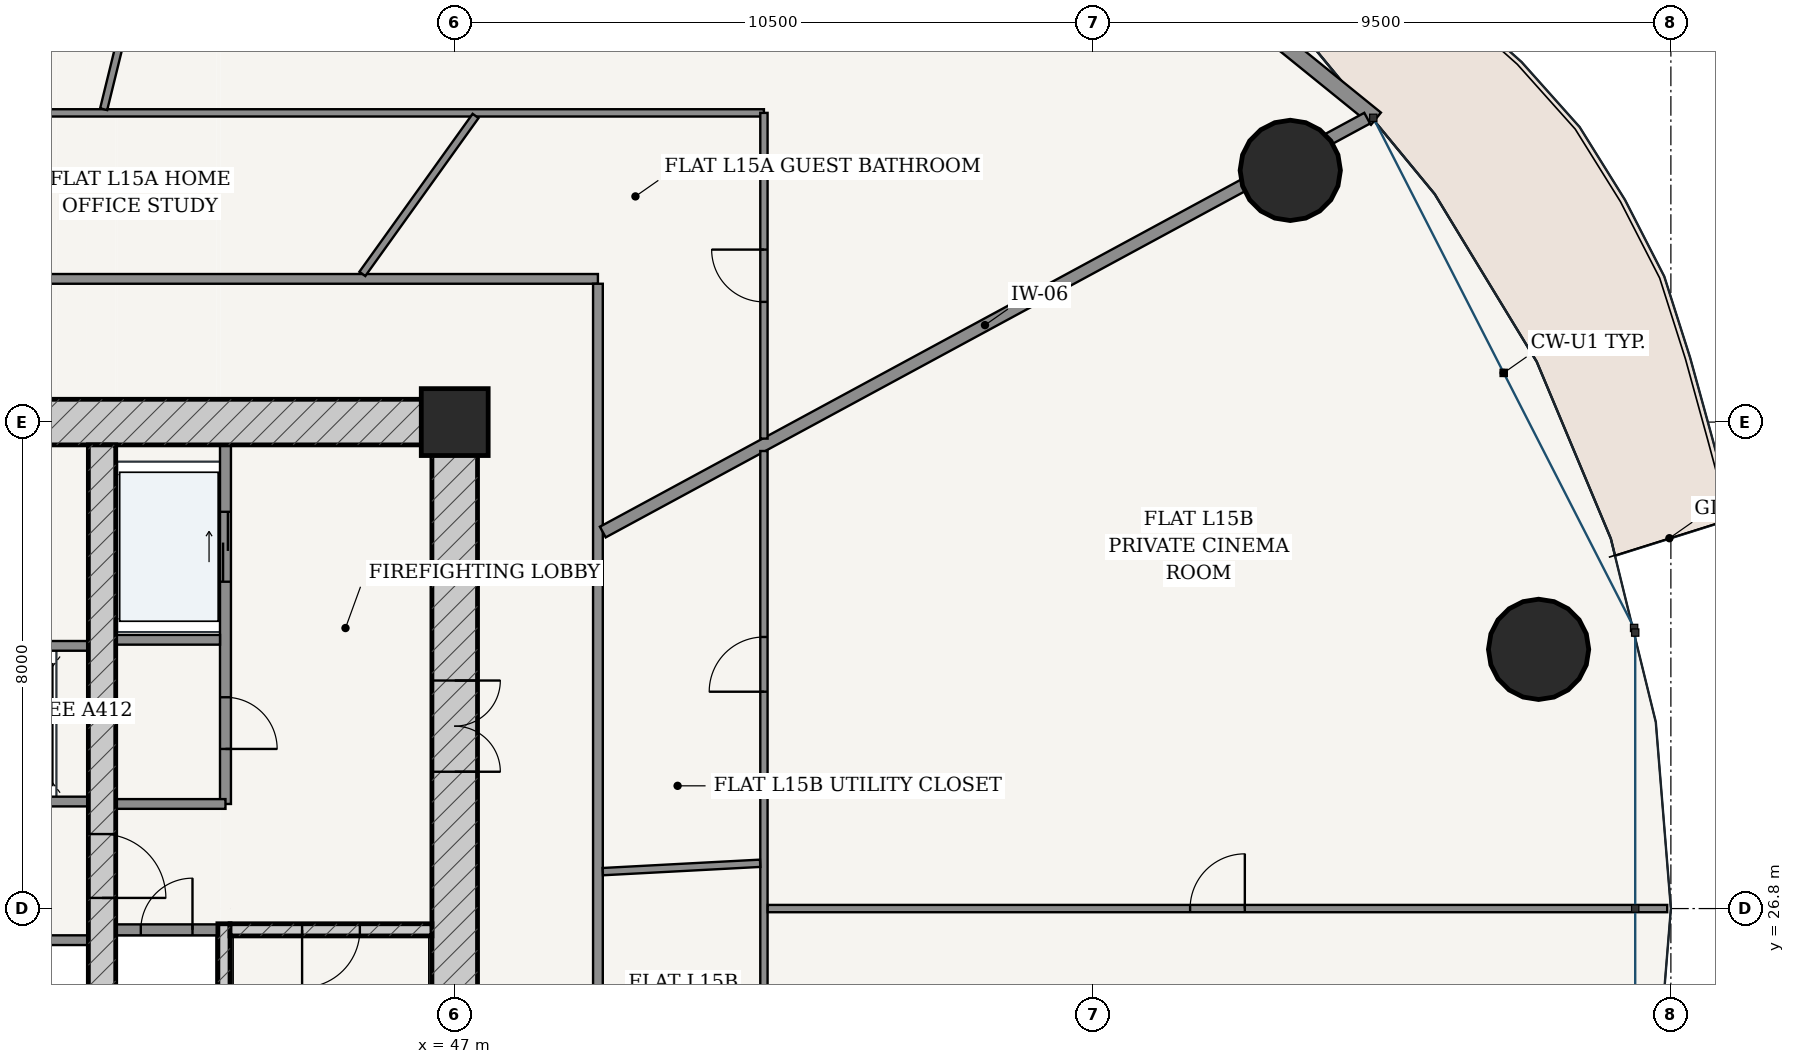
"""IFC4 building model, lengths in metres.
Left out: names, types, materials, properties, quantities, classifications, styles, units other than length and angle.
Written with IfcOpenShell. Run it as: python <this file> out.ifc"""

import sys

from ifc_helpers import new_model, si_unit, direction, frame, frame_2d, origin, origin_2d, place, context, subcontext, project, spatial, rectangle, hollow_circle, extrude, source, transform, mapped, element, fill, save


model = new_model("IFC4")
c1 = context("Model", 3, precision=1e-05, world=origin(), true_north=direction((-0.2419218956, 0.970295726276)))
c2 = subcontext(c1, "Body", "Model", "MODEL_VIEW")
j1 = project(units=[si_unit("LENGTHUNIT", "METRE"), si_unit("PLANEANGLEUNIT", "RADIAN")], contexts=[c1])
p1 = place(None, origin())
s1 = spatial("IfcSite", under=j1, at=p1, CompositionType="ELEMENT")
p2 = place(p1, origin())
s2 = spatial("IfcBuilding", under=s1, at=p2, CompositionType="ELEMENT")
p3 = place(p2, frame((0.0, 0.0, 60.0)))
s3 = spatial("IfcBuildingStorey", under=s2, at=p3, CompositionType="ELEMENT", Elevation=60.0)
p4 = place(p3, frame((47.0, 34.8, 0.0), z_axis=(0.0, 0.0, 1.0), x_axis=(1.0, 0.0, 0.0)))
e1 = element("IfcColumn", 1, at=p4, inside=s3, PredefinedType="COLUMN", context=c2, shape_type="SweptSolid", body=[
    extrude(rectangle(XDim=1.1, YDim=1.1, at=origin_2d()), origin(), (0.0, 0.0, 1.0), 3.6),
])
p5 = place(p3, frame((28.625, 34.8, 0.0), z_axis=(0.0, 0.0, 1.0), x_axis=(1.0, 0.0, 0.0)))
e2 = element("IfcWall", 2, at=p5, inside=s3, PredefinedType="SHEAR", context=c2, shape_type="SweptSolid", body=[
    extrude(rectangle(XDim=18.75, YDim=0.75, at=frame_2d((9.375, 0.0))), origin(), (0.0, 0.0, 1.0), 3.32),
])
p6 = place(p5, frame((8.95, 0.0, 0.0)))
e3 = element("IfcOpeningElement", 3, at=p6, cuts=e2, PredefinedType="OPENING", context=c2, shape_type="SweptSolid", body=[
    extrude(rectangle(XDim=0.85, YDim=2.1, at=frame_2d((0.425, 1.05))), frame((0.0, 0.385, 0.0), z_axis=(0.0, -1.0, 0.0), x_axis=(1.0, 0.0, 0.0)), (0.0, 0.0, 1.0), 0.77),
])
p7 = place(p3, frame((47.0, 19.175, 0.0), z_axis=(0.0, 0.0, 1.0), x_axis=(0.0, 1.0, 0.0)))
e4 = element("IfcWall", 4, at=p7, inside=s3, PredefinedType="SHEAR", context=c2, shape_type="SweptSolid", body=[
    extrude(rectangle(XDim=15.25, YDim=0.75, at=frame_2d((7.625, 0.0))), origin(), (0.0, 0.0, 1.0), 3.32),
])
p8 = place(p7, frame((9.875, 0.0, 0.0)))
e5 = element("IfcOpeningElement", 5, at=p8, cuts=e4, PredefinedType="OPENING", context=c2, shape_type="SweptSolid", body=[
    extrude(rectangle(XDim=1.5, YDim=2.2, at=frame_2d((0.75, 1.1))), frame((0.0, 0.385, 0.0), z_axis=(0.0, -1.0, 0.0), x_axis=(1.0, 0.0, 0.0)), (0.0, 0.0, 1.0), 0.77),
])
p9 = place(p3, frame((43.205, 19.175, 0.0), z_axis=(0.0, 0.0, 1.0), x_axis=(0.0, 1.0, 0.0)))
e6 = element("IfcWall", 6, at=p9, inside=s3, PredefinedType="SOLIDWALL", context=c2, shape_type="SweptSolid", body=[
    extrude(rectangle(XDim=7.375, YDim=0.2, at=frame_2d((3.688, 0.0))), origin(), (0.0, 0.0, 1.0), 3.32),
])
p10 = place(p3, frame((43.305, 26.45, 0.0), z_axis=(0.0, 0.0, 1.0), x_axis=(1.0, 0.0, 0.0)))
e7 = element("IfcWall", 7, at=p10, inside=s3, PredefinedType="SOLIDWALL", context=c2, shape_type="SweptSolid", body=[
    extrude(rectangle(XDim=3.32, YDim=0.2, at=frame_2d((1.66, 0.0))), origin(), (0.0, 0.0, 1.0), 3.32),
])
p11 = place(p10, frame((1.185, 0.0, 0.0)))
e8 = element("IfcOpeningElement", 8, at=p11, cuts=e7, PredefinedType="OPENING", context=c2, shape_type="SweptSolid", body=[
    extrude(rectangle(XDim=0.95, YDim=2.15, at=frame_2d((0.475, 1.075))), frame((0.0, 0.11, 0.0), z_axis=(0.0, -1.0, 0.0), x_axis=(1.0, 0.0, 0.0)), (0.0, 0.0, 1.0), 0.22),
])
p12 = place(p3, frame((41.2, 19.175, 0.0), z_axis=(0.0, 0.0, 1.0), x_axis=(0.0, 1.0, 0.0)))
e9 = element("IfcWall", 9, at=p12, inside=s3, PredefinedType="SHEAR", context=c2, shape_type="SweptSolid", body=[
    extrude(rectangle(XDim=15.25, YDim=0.45, at=frame_2d((7.625, 0.0))), origin(), (0.0, 0.0, 1.0), 3.32),
])
p13 = place(p12, frame((7.8, 0.0, 0.0)))
e10 = element("IfcOpeningElement", 10, at=p13, cuts=e9, PredefinedType="OPENING", context=c2, shape_type="SweptSolid", body=[
    extrude(rectangle(XDim=1.05, YDim=2.15, at=frame_2d((0.525, 1.075))), frame((0.0, 0.235, 0.0), z_axis=(0.0, -1.0, 0.0), x_axis=(1.0, 0.0, 0.0)), (0.0, 0.0, 1.0), 0.47),
])
for number, where, z_axis, x_axis in (
    (11, (64.824, 31.063, 0.0), (0.0, 0.0, 1.0), (1.0, 0.0, 0.0)),
    (12, (60.741, 38.939, 0.0), (0.0, 0.0, 1.0), (1.0, 0.0, 0.0)),
):
    element("IfcColumn", number, at=place(p3, frame(where, z_axis=z_axis, x_axis=x_axis)), inside=s3, PredefinedType="COLUMN", context=c2, shape_type="SweptSolid", body=[
        extrude(hollow_circle(Radius=0.825, WallThickness=0.05, at=origin_2d()), origin(), (0.0, 0.0, 1.0), 3.6),
    ])
p14 = place(p3, frame((62.15, 39.789, 0.0), z_axis=(0.0, 0.0, 1.0), x_axis=(-0.777005352078, 0.62949398952, 0.0)))
e13 = element("IfcWall", 13, at=p14, inside=s3, PredefinedType="SOLIDWALL", context=c2, shape_type="SweptSolid", body=[
    extrude(rectangle(XDim=10.447, YDim=0.26, at=frame_2d((5.223, 0.0))), origin(), (0.0, 0.0, 1.0), 3.32),
])
p15 = place(p14, frame((4.548, 0.0, 0.0)))
e14 = element("IfcOpeningElement", 14, at=p15, cuts=e13, PredefinedType="OPENING", context=c2, shape_type="SweptSolid", body=[
    extrude(rectangle(XDim=1.35, YDim=2.2, at=frame_2d((0.675, 1.1))), frame((0.0, 0.14, 0.0), z_axis=(0.0, -1.0, 0.0), x_axis=(1.0, 0.0, 0.0)), (0.0, 0.0, 1.0), 0.28),
])
p16 = place(p3, frame((41.425, 26.45, 0.0), z_axis=(0.0, 0.0, 1.0), x_axis=(1.0, 0.0, 0.0)))
e15 = element("IfcWall", 15, at=p16, inside=s3, PredefinedType="PARTITIONING", context=c2, shape_type="SweptSolid", body=[
    extrude(rectangle(XDim=1.675, YDim=0.18, at=frame_2d((0.837, 0.0))), origin(), (0.0, 0.0, 1.0), 3.32),
])
p17 = place(p16, frame((0.413, 0.0, 0.0)))
e16 = element("IfcOpeningElement", 16, at=p17, cuts=e15, PredefinedType="OPENING", context=c2, shape_type="SweptSolid", body=[
    extrude(rectangle(XDim=0.85, YDim=2.1, at=frame_2d((0.425, 1.05))), frame((0.0, 0.1, 0.0), z_axis=(0.0, -1.0, 0.0), x_axis=(1.0, 0.0, 0.0)), (0.0, 0.0, 1.0), 0.2),
])
p18 = place(p3, frame((43.23, 28.52, 0.0), z_axis=(0.0, 0.0, 1.0), x_axis=(0.0, 1.0, 0.0)))
e17 = element("IfcWall", 17, at=p18, inside=s3, PredefinedType="PARTITIONING", context=c2, shape_type="SweptSolid", body=[
    extrude(rectangle(XDim=5.905, YDim=0.18, at=frame_2d((2.953, 0.0))), origin(), (0.0, 0.0, 1.0), 3.32),
])
p19 = place(p18, frame((0.905, 0.0, 0.0)))
e18 = element("IfcOpeningElement", 18, at=p19, cuts=e17, PredefinedType="OPENING", context=c2, shape_type="SweptSolid", body=[
    extrude(rectangle(XDim=0.85, YDim=2.1, at=frame_2d((0.425, 1.05))), frame((0.0, 0.1, 0.0), z_axis=(0.0, -1.0, 0.0), x_axis=(1.0, 0.0, 0.0)), (0.0, 0.0, 1.0), 0.2),
])
p20 = place(p18, frame((3.655, 0.0, 0.0)))
e19 = element("IfcOpeningElement", 19, at=p20, cuts=e17, PredefinedType="OPENING", context=c2, shape_type="SweptSolid", body=[
    extrude(rectangle(XDim=1.15, YDim=2.2, at=frame_2d((0.575, 1.1))), frame((0.0, 0.1, 0.0), z_axis=(0.0, -1.0, 0.0), x_axis=(1.0, 0.0, 0.0)), (0.0, 0.0, 1.0), 0.2),
])
p21 = place(p3, frame((41.425, 31.22, 0.0), z_axis=(0.0, 0.0, 1.0), x_axis=(1.0, 0.0, 0.0)))
e20 = element("IfcWall", 20, at=p21, inside=s3, PredefinedType="PARTITIONING", context=c2, shape_type="SweptSolid", body=[
    extrude(rectangle(XDim=1.715, YDim=0.16, at=frame_2d((0.857, 0.0))), origin(), (0.0, 0.0, 1.0), 3.32),
])
p22 = place(p3, frame((41.425, 28.52, 0.0), z_axis=(0.0, 0.0, 1.0), x_axis=(1.0, 0.0, 0.0)))
e21 = element("IfcWall", 21, at=p22, inside=s3, PredefinedType="PARTITIONING", context=c2, shape_type="SweptSolid", body=[
    extrude(rectangle(XDim=1.805, YDim=0.16, at=frame_2d((0.902, 0.0))), origin(), (0.0, 0.0, 1.0), 3.32),
])
p23 = place(p3, frame((35.025, 28.56, 0.0), z_axis=(0.0, 0.0, 1.0), x_axis=(1.0, 0.0, 0.0)))
e22 = element("IfcWall", 22, at=p23, inside=s3, PredefinedType="PARTITIONING", context=c2, shape_type="SweptSolid", body=[
    extrude(rectangle(XDim=5.95, YDim=0.16, at=frame_2d((2.975, 0.0))), origin(), (0.0, 0.0, 1.0), 3.32),
])
p24 = place(p23, frame((0.76, 0.0, 0.0)))
e23 = element("IfcOpeningElement", 23, at=p24, cuts=e22, PredefinedType="OPENING", context=c2, shape_type="SweptSolid", body=[
    extrude(rectangle(XDim=1.1, YDim=2.2, at=frame_2d((0.55, 1.1))), frame((0.0, 0.09, 0.0), z_axis=(0.0, -1.0, 0.0), x_axis=(1.0, 0.0, 0.0)), (0.0, 0.0, 1.0), 0.18),
])
p25 = place(p23, frame((2.425, 0.0, 0.0)))
e24 = element("IfcOpeningElement", 24, at=p25, cuts=e22, PredefinedType="OPENING", context=c2, shape_type="SweptSolid", body=[
    extrude(rectangle(XDim=1.1, YDim=2.2, at=frame_2d((0.55, 1.1))), frame((0.0, 0.09, 0.0), z_axis=(0.0, -1.0, 0.0), x_axis=(1.0, 0.0, 0.0)), (0.0, 0.0, 1.0), 0.18),
])
p26 = place(p23, frame((4.09, 0.0, 0.0)))
e25 = element("IfcOpeningElement", 25, at=p26, cuts=e22, PredefinedType="OPENING", context=c2, shape_type="SweptSolid", body=[
    extrude(rectangle(XDim=1.1, YDim=2.2, at=frame_2d((0.55, 1.1))), frame((0.0, 0.09, 0.0), z_axis=(0.0, -1.0, 0.0), x_axis=(1.0, 0.0, 0.0)), (0.0, 0.0, 1.0), 0.18),
])
for number, where, z_axis, x_axis in (
    (26, (35.025, 31.12, 0.0), (0.0, 0.0, 1.0), (1.0, 0.0, 0.0)),
    (27, (35.025, 26.28, 0.0), (0.0, 0.0, 1.0), (1.0, 0.0, 0.0)),
):
    element("IfcWall", number, at=place(p3, frame(where, z_axis=z_axis, x_axis=x_axis)), inside=s3, PredefinedType="PARTITIONING", context=c2, shape_type="SweptSolid", body=[
        extrude(rectangle(XDim=5.95, YDim=0.16, at=frame_2d((2.975, 0.0))), origin(), (0.0, 0.0, 1.0), 3.32),
    ])
p27 = place(p3, frame((26.645, 37.155, 0.0), z_axis=(0.0, 0.0, 1.0), x_axis=(1.0, 0.0, 0.0)))
e28 = element("IfcWall", 28, at=p27, inside=s3, PredefinedType="PARTITIONING", context=c2, shape_type="SweptSolid", body=[
    extrude(rectangle(XDim=22.71, YDim=0.16, at=frame_2d((11.355, 0.0))), origin(), (0.0, 0.0, 1.0), 2.688),
])
p28 = place(p3, frame((49.355, 16.525, 0.0), z_axis=(0.0, 0.0, 1.0), x_axis=(0.0, 1.0, 0.0)))
e29 = element("IfcWall", 29, at=p28, inside=s3, PredefinedType="PARTITIONING", context=c2, shape_type="SweptSolid", body=[
    extrude(rectangle(XDim=20.55, YDim=0.16, at=frame_2d((10.275, 0.0))), origin(), (0.0, 0.0, 1.0), 2.688),
])
p29 = place(p28, frame((2.733, 0.0, 0.0)))
e30 = element("IfcOpeningElement", 30, at=p29, cuts=e29, PredefinedType="OPENING", context=c2, shape_type="SweptSolid", body=[
    extrude(rectangle(XDim=0.98, YDim=2.2, at=frame_2d((0.49, 1.1))), frame((0.0, 0.09, 0.0), z_axis=(0.0, -1.0, 0.0), x_axis=(1.0, 0.0, 0.0)), (0.0, 0.0, 1.0), 0.18),
])
p30 = place(p3, frame((49.435, 32.991, 0.0), z_axis=(0.0, 0.0, 1.0), x_axis=(0.879369737803, 0.476139542819, 0.0)))
e31 = element("IfcWall", 31, at=p30, inside=s3, PredefinedType="PARTITIONING", context=c2, shape_type="SweptSolid", body=[
    extrude(rectangle(XDim=14.295, YDim=0.2, at=frame_2d((7.147, 0.0))), origin(), (0.0, 0.0, 1.0), 2.688),
])
p31 = place(p3, frame((23.915, 39.885, 0.0), z_axis=(0.0, 0.0, 1.0), x_axis=(1.0, 0.0, 0.0)))
e32 = element("IfcWall", 32, at=p31, inside=s3, PredefinedType="PARTITIONING", context=c2, shape_type="SweptSolid", body=[
    extrude(rectangle(XDim=28.17, YDim=0.12, at=frame_2d((14.085, 0.0))), origin(), (0.0, 0.0, 1.0), 2.688),
])
p32 = place(p31, frame((12.891, 0.0, 0.0)))
e33 = element("IfcOpeningElement", 33, at=p32, cuts=e32, PredefinedType="OPENING", context=c2, shape_type="SweptSolid", body=[
    extrude(rectangle(XDim=0.9, YDim=2.15, at=frame_2d((0.45, 1.075))), frame((0.0, 0.07, 0.0), z_axis=(0.0, -1.0, 0.0), x_axis=(1.0, 0.0, 0.0)), (0.0, 0.0, 1.0), 0.14),
])
p33 = place(p3, frame((52.085, 39.885, 0.0), z_axis=(0.0, 0.0, 1.0), x_axis=(0.0, -1.0, 0.0)))
e34 = element("IfcWall", 34, at=p33, inside=s3, PredefinedType="PARTITIONING", context=c2, shape_type="SweptSolid", body=[
    extrude(rectangle(XDim=5.357, YDim=0.12, at=frame_2d((2.678, 0.0))), origin(), (0.0, 0.0, 1.0), 2.999),
])
p34 = place(p33, frame((2.248, 0.0, 0.0)))
e35 = element("IfcOpeningElement", 35, at=p34, cuts=e34, PredefinedType="OPENING", context=c2, shape_type="SweptSolid", body=[
    extrude(rectangle(XDim=0.86, YDim=2.15, at=frame_2d((0.43, 1.075))), frame((0.0, 0.07, 0.0), z_axis=(0.0, -1.0, 0.0), x_axis=(1.0, 0.0, 0.0)), (0.0, 0.0, 1.0), 0.14),
])
p35 = place(p3, frame((41.227, 39.945, 0.0), z_axis=(0.0, 0.0, 1.0), x_axis=(0.238375747469, 0.97117300365, 0.0)))
e36 = element("IfcWall", 36, at=p35, inside=s3, PredefinedType="PARTITIONING", context=c2, shape_type="SweptSolid", body=[
    extrude(rectangle(XDim=10.086, YDim=0.12, at=frame_2d((5.043, 0.0))), origin(), (0.0, 0.0, 1.0), 2.688),
])
p36 = place(p35, frame((3.518, 0.0, 0.0)))
e37 = element("IfcOpeningElement", 37, at=p36, cuts=e36, PredefinedType="OPENING", context=c2, shape_type="SweptSolid", body=[
    extrude(rectangle(XDim=0.9, YDim=2.15, at=frame_2d((0.45, 1.075))), frame((0.0, 0.07, 0.0), z_axis=(0.0, -1.0, 0.0), x_axis=(1.0, 0.0, 0.0)), (0.0, 0.0, 1.0), 0.14),
])
p37 = place(p3, frame((45.481, 37.237, 0.0), z_axis=(0.0, 0.0, 1.0), x_axis=(0.582530715463, 0.812808689387, 0.0)))
e38 = element("IfcWall", 38, at=p37, inside=s3, PredefinedType="PARTITIONING", context=c2, shape_type="SweptSolid", body=[
    extrude(rectangle(XDim=3.197, YDim=0.12, at=frame_2d((1.598, 0.0))), origin(), (0.0, 0.0, 1.0), 3.32),
])
p38 = place(p3, frame((52.085, 34.324, 0.0), z_axis=(0.0, 0.0, 1.0), x_axis=(0.0, -1.0, 0.0)))
e39 = element("IfcWall", 39, at=p38, inside=s3, PredefinedType="PARTITIONING", context=c2, shape_type="SweptSolid", body=[
    extrude(rectangle(XDim=20.609, YDim=0.12, at=frame_2d((10.305, 0.0))), origin(), (0.0, 0.0, 1.0), 2.688),
])
p39 = place(p38, frame((15.972, 0.0, 0.0)))
e40 = element("IfcOpeningElement", 40, at=p39, cuts=e39, PredefinedType="OPENING", context=c2, shape_type="SweptSolid", body=[
    extrude(rectangle(XDim=0.9, YDim=2.15, at=frame_2d((0.45, 1.075))), frame((0.0, 0.07, 0.0), z_axis=(0.0, -1.0, 0.0), x_axis=(1.0, 0.0, 0.0)), (0.0, 0.0, 1.0), 0.14),
])
p40 = place(p38, frame((3.058, 0.0, 0.0)))
e41 = element("IfcOpeningElement", 41, at=p40, cuts=e39, PredefinedType="OPENING", context=c2, shape_type="SweptSolid", body=[
    extrude(rectangle(XDim=0.9, YDim=2.15, at=frame_2d((0.45, 1.075))), frame((0.0, 0.07, 0.0), z_axis=(0.0, -1.0, 0.0), x_axis=(1.0, 0.0, 0.0)), (0.0, 0.0, 1.0), 0.14),
])
p41 = place(p3, frame((52.147, 26.8, 0.0), z_axis=(0.0, 0.0, 1.0), x_axis=(1.0, 0.0, 0.0)))
e42 = element("IfcWall", 42, at=p41, inside=s3, PredefinedType="PARTITIONING", context=c2, shape_type="SweptSolid", body=[
    extrude(rectangle(XDim=14.793, YDim=0.12, at=frame_2d((7.396, 0.0))), origin(), (0.0, 0.0, 1.0), 2.762),
])
p42 = place(p41, frame((6.947, 0.0, 0.0)))
e43 = element("IfcOpeningElement", 43, at=p42, cuts=e42, PredefinedType="OPENING", context=c2, shape_type="SweptSolid", body=[
    extrude(rectangle(XDim=0.9, YDim=2.15, at=frame_2d((0.45, 1.075))), frame((0.0, 0.07, 0.0), z_axis=(0.0, -1.0, 0.0), x_axis=(1.0, 0.0, 0.0)), (0.0, 0.0, 1.0), 0.14),
])
p43 = place(p3, frame((49.435, 27.407, 0.0), z_axis=(0.0, 0.0, 1.0), x_axis=(0.998587742853, 0.053127392413, 0.0)))
e44 = element("IfcWall", 44, at=p43, inside=s3, PredefinedType="PARTITIONING", context=c2, shape_type="SweptSolid", body=[
    extrude(rectangle(XDim=2.592, YDim=0.12, at=frame_2d((1.296, 0.0))), origin(), (0.0, 0.0, 1.0), 3.32),
])
m1 = source(origin(), c2, "Body", "SweptSolid", [
    extrude(rectangle(XDim=1.5, YDim=2.2, at=frame_2d((0.75, 1.1))), frame((0.0, 0.025, 0.0), z_axis=(0.0, -1.0, 0.0), x_axis=(1.0, 0.0, 0.0)), (0.0, 0.0, 1.0), 0.05),
])
p44 = place(p8, frame((1.5, 0.0, 0.0), z_axis=(0.0, 0.0, 1.0), x_axis=(-1.0, 0.0, 0.0)))
e45 = element("IfcDoor", 45, at=p44, inside=s3, OperationType="DOUBLE_DOOR_SINGLE_SWING", PredefinedType="DOOR", context=c2, shape_type="MappedRepresentation", body=[
    mapped(m1, transform((0.0, 0.0, 0.0), scale=1.0)),
])
fill(e5, e45)
m2 = source(origin(), c2, "Body", "SweptSolid", [
    extrude(rectangle(XDim=1.05, YDim=2.15, at=frame_2d((0.525, 1.075))), frame((0.0, 0.025, 0.0), z_axis=(0.0, -1.0, 0.0), x_axis=(1.0, 0.0, 0.0)), (0.0, 0.0, 1.0), 0.05),
])
p45 = place(p13, frame((1.05, 0.0, 0.0), z_axis=(0.0, 0.0, 1.0), x_axis=(-1.0, 0.0, 0.0)))
e46 = element("IfcDoor", 46, at=p45, inside=s3, OperationType="SINGLE_SWING_RIGHT", PredefinedType="DOOR", context=c2, shape_type="MappedRepresentation", body=[
    mapped(m2, transform((0.0, 0.0, 0.0), scale=1.0)),
])
fill(e10, e46)
m3 = source(origin(), c2, "Body", "SweptSolid", [
    extrude(rectangle(XDim=0.95, YDim=2.15, at=frame_2d((0.475, 1.075))), frame((0.0, 0.025, 0.0), z_axis=(0.0, -1.0, 0.0), x_axis=(1.0, 0.0, 0.0)), (0.0, 0.0, 1.0), 0.05),
])
p46 = place(p11, frame((0.95, 0.0, 0.0), z_axis=(0.0, 0.0, 1.0), x_axis=(-1.0, 0.0, 0.0)))
e47 = element("IfcDoor", 47, at=p46, inside=s3, OperationType="SINGLE_SWING_RIGHT", PredefinedType="DOOR", context=c2, shape_type="MappedRepresentation", body=[
    mapped(m3, transform((0.0, 0.0, 0.0), scale=1.0)),
])
fill(e8, e47)
m4 = source(origin(), c2, "Body", "SweptSolid", [
    extrude(rectangle(XDim=0.85, YDim=2.1, at=frame_2d((0.425, 1.05))), frame((0.0, 0.025, 0.0), z_axis=(0.0, -1.0, 0.0), x_axis=(1.0, 0.0, 0.0)), (0.0, 0.0, 1.0), 0.05),
])
p47 = place(p17, origin())
e48 = element("IfcDoor", 48, at=p47, inside=s3, OperationType="SINGLE_SWING_RIGHT", PredefinedType="DOOR", context=c2, shape_type="MappedRepresentation", body=[
    mapped(m4, transform((0.0, 0.0, 0.0), scale=1.0)),
])
fill(e16, e48)
p48 = place(p19, frame((0.85, 0.0, 0.0), z_axis=(0.0, 0.0, 1.0), x_axis=(-1.0, 0.0, 0.0)))
e49 = element("IfcDoor", 49, at=p48, inside=s3, OperationType="SINGLE_SWING_RIGHT", PredefinedType="DOOR", context=c2, shape_type="MappedRepresentation", body=[
    mapped(m4, transform((0.0, 0.0, 0.0), scale=1.0)),
])
fill(e18, e49)
m5 = source(origin(), c2, "Body", "SweptSolid", [
    extrude(rectangle(XDim=1.15, YDim=2.2, at=frame_2d((0.575, 1.1))), frame((0.0, 0.025, 0.0), z_axis=(0.0, -1.0, 0.0), x_axis=(1.0, 0.0, 0.0)), (0.0, 0.0, 1.0), 0.05),
])
p49 = place(p20, origin())
e50 = element("IfcDoor", 50, at=p49, inside=s3, OperationType="DOUBLE_DOOR_SLIDING", PredefinedType="DOOR", context=c2, shape_type="MappedRepresentation", body=[
    mapped(m5, transform((0.0, 0.0, 0.0), scale=1.0)),
])
fill(e19, e50)
m6 = source(origin(), c2, "Body", "SweptSolid", [
    extrude(rectangle(XDim=0.86, YDim=2.15, at=frame_2d((0.43, 1.075))), frame((0.0, 0.025, 0.0), z_axis=(0.0, -1.0, 0.0), x_axis=(1.0, 0.0, 0.0)), (0.0, 0.0, 1.0), 0.05),
])
p50 = place(p34, frame((0.86, 0.0, 0.0), z_axis=(0.0, 0.0, 1.0), x_axis=(-1.0, 0.0, 0.0)))
e51 = element("IfcDoor", 51, at=p50, inside=s3, OperationType="SINGLE_SWING_RIGHT", PredefinedType="DOOR", context=c2, shape_type="MappedRepresentation", body=[
    mapped(m6, transform((0.0, 0.0, 0.0), scale=1.0)),
])
fill(e35, e51)
m7 = source(origin(), c2, "Body", "SweptSolid", [
    extrude(rectangle(XDim=0.9, YDim=2.15, at=frame_2d((0.45, 1.075))), frame((0.0, 0.025, 0.0), z_axis=(0.0, -1.0, 0.0), x_axis=(1.0, 0.0, 0.0)), (0.0, 0.0, 1.0), 0.05),
])
p51 = place(p42, origin())
e52 = element("IfcDoor", 52, at=p51, inside=s3, OperationType="SINGLE_SWING_RIGHT", PredefinedType="DOOR", context=c2, shape_type="MappedRepresentation", body=[
    mapped(m7, transform((0.0, 0.0, 0.0), scale=1.0)),
])
fill(e43, e52)
p52 = place(p40, frame((0.9, 0.0, 0.0), z_axis=(0.0, 0.0, 1.0), x_axis=(-1.0, 0.0, 0.0)))
e53 = element("IfcDoor", 53, at=p52, inside=s3, OperationType="SINGLE_SWING_LEFT", PredefinedType="DOOR", context=c2, shape_type="MappedRepresentation", body=[
    mapped(m7, transform((0.0, 0.0, 0.0), scale=1.0)),
])
fill(e41, e53)
save(model, sys.argv[1])
